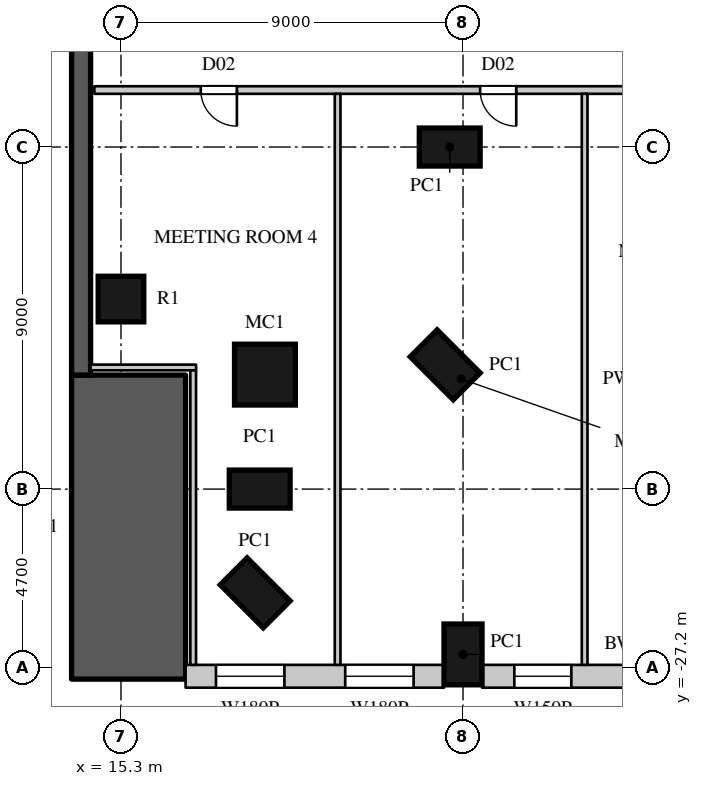
"""IFC4 building model, lengths in metres.
Left out: names, types, materials, properties, quantities, classifications, styles, units other than length and angle.
Written with IfcOpenShell. Run it as: python <this file> out.ifc"""

import sys

from ifc_helpers import new_model, si_unit, direction, frame, frame_2d, origin, origin_2d, place, context, subcontext, project, spatial, rectangle, circle, extrude, element, fill, save


model = new_model("IFC4")
c1 = context("Model", 3, precision=1e-05, world=origin(), true_north=direction((0.0, 1.0)))
c2 = subcontext(c1, "Body", "Model", "MODEL_VIEW")
j1 = project(units=[si_unit("LENGTHUNIT", "METRE"), si_unit("PLANEANGLEUNIT", "RADIAN")], contexts=[c1])
p1 = place(None, origin())
s1 = spatial("IfcSite", under=j1, at=p1, CompositionType="ELEMENT")
p2 = place(p1, origin())
s2 = spatial("IfcBuilding", under=s1, at=p2, CompositionType="ELEMENT")
p3 = place(p2, frame((0.0, 0.0, 19.0)))
s3 = spatial("IfcBuildingStorey", under=s2, at=p3, CompositionType="ELEMENT", Elevation=19.0)
p4 = place(p3, frame((15.5, -27.5, 0.0), z_axis=(0.0, 0.0, 1.0), x_axis=(0.0, 1.0, 0.0)))
e1 = element("IfcWall", 1, at=p4, inside=s3, PredefinedType="SOLIDWALL", context=c2, shape_type="SweptSolid", body=[
    extrude(rectangle(XDim=8.0, YDim=3.0, at=frame_2d((4.0, 0.0))), origin(), (0.0, 0.0, 1.0), 10.0),
])
p5 = place(p3, frame((14.25, -19.5, 0.0), z_axis=(0.0, 0.0, 1.0), x_axis=(0.0, 1.0, 0.0)))
e2 = element("IfcWall", 2, at=p5, inside=s3, PredefinedType="SOLIDWALL", context=c2, shape_type="SweptSolid", body=[
    extrude(rectangle(XDim=39.0, YDim=0.5, at=frame_2d((19.5, 0.0))), origin(), (0.0, 0.0, 1.0), 10.0),
])
for number, where, z_axis, x_axis in (
    (3, (18.831, -25.231, 0.0), (0.0, 0.0, 1.0), (0.707, 0.707, 0.0)),
    (4, (18.95, -22.5, 0.0), (0.0, 0.0, 1.0), (0.0, 1.0, 0.0)),
):
    element("IfcColumn", number, at=place(p3, frame(where, z_axis=z_axis, x_axis=x_axis)), inside=s3, PredefinedType="COLUMN", context=c2, shape_type="SweptSolid", body=[
        extrude(rectangle(XDim=1.0, YDim=1.6, at=origin_2d()), origin(), (0.0, 0.0, 1.0), 10.0),
    ])
p6 = place(p3, frame((19.088, -19.488, 0.0), z_axis=(0.0, 0.0, 1.0), x_axis=(1.0, 0.0, 0.0)))
e5 = element("IfcColumn", 5, at=p6, inside=s3, PredefinedType="COLUMN", context=c2, shape_type="SweptSolid", body=[
    extrude(circle(Radius=0.8, at=origin_2d()), origin(), (0.0, 0.0, 1.0), 10.0),
])
for number, where, z_axis, x_axis in (
    (6, (23.831, -19.231, 0.0), (0.0, 0.0, 1.0), (0.707, 0.707, 0.0)),
    (7, (23.95, -13.5, 0.0), (0.0, 0.0, 1.0), (0.0, 1.0, 0.0)),
    (8, (24.3, -26.85, 0.0), (0.0, 0.0, 1.0), (1.0, 0.0, 0.0)),
):
    element("IfcColumn", number, at=place(p3, frame(where, z_axis=z_axis, x_axis=x_axis)), inside=s3, PredefinedType="COLUMN", context=c2, shape_type="SweptSolid", body=[
        extrude(rectangle(XDim=1.0, YDim=1.6, at=origin_2d()), origin(), (0.0, 0.0, 1.0), 10.0),
    ])
p7 = place(p3, frame((15.3, -17.5, 0.0), z_axis=(0.0, 0.0, 1.0), x_axis=(1.0, 0.0, 0.0)))
e9 = element("IfcColumn", 9, at=p7, inside=s3, PredefinedType="COLUMN", context=c2, shape_type="SweptSolid", body=[
    extrude(circle(Radius=0.6, at=origin_2d()), origin(), (0.0, 0.0, 1.0), 10.0),
])
p8 = place(p3, frame((17.0, -27.425, 0.0), z_axis=(0.0, 0.0, 1.0), x_axis=(1.0, 0.0, 0.0)))
e10 = element("IfcWall", 10, at=p8, inside=s3, PredefinedType="ELEMENTEDWALL", context=c2, shape_type="SweptSolid", body=[
    extrude(rectangle(XDim=6.8, YDim=0.6, at=frame_2d((3.4, 0.0))), origin(), (0.0, 0.0, 1.0), 9.6),
])
p9 = place(p8, frame((0.8, 0.0, 3.0)))
e11 = element("IfcOpeningElement", 11, at=p9, cuts=e10, PredefinedType="OPENING", context=c2, shape_type="SweptSolid", body=[
    extrude(rectangle(XDim=1.8, YDim=2.4, at=frame_2d((0.9, 1.2))), frame((0.0, 0.31, 0.0), z_axis=(0.0, -1.0, 0.0), x_axis=(1.0, 0.0, 0.0)), (0.0, 0.0, 1.0), 0.62),
])
p10 = place(p8, frame((4.2, 0.0, 3.0)))
e12 = element("IfcOpeningElement", 12, at=p10, cuts=e10, PredefinedType="OPENING", context=c2, shape_type="SweptSolid", body=[
    extrude(rectangle(XDim=1.8, YDim=2.4, at=frame_2d((0.9, 1.2))), frame((0.0, 0.31, 0.0), z_axis=(0.0, -1.0, 0.0), x_axis=(1.0, 0.0, 0.0)), (0.0, 0.0, 1.0), 0.62),
])
p11 = place(p3, frame((24.8, -27.425, 0.0), z_axis=(0.0, 0.0, 1.0), x_axis=(1.0, 0.0, 0.0)))
e13 = element("IfcWall", 13, at=p11, inside=s3, PredefinedType="ELEMENTEDWALL", context=c2, shape_type="SweptSolid", body=[
    extrude(rectangle(XDim=8.0, YDim=0.6, at=frame_2d((4.0, 0.0))), origin(), (0.0, 0.0, 1.0), 9.6),
])
p12 = place(p11, frame((4.8, 0.0, 3.0)))
e14 = element("IfcOpeningElement", 14, at=p12, cuts=e13, PredefinedType="OPENING", context=c2, shape_type="SweptSolid", body=[
    extrude(rectangle(XDim=2.4, YDim=2.4, at=frame_2d((1.2, 1.2))), frame((0.0, 0.31, 0.0), z_axis=(0.0, -1.0, 0.0), x_axis=(1.0, 0.0, 0.0)), (0.0, 0.0, 1.0), 0.62),
])
p13 = place(p11, frame((0.85, 0.0, 3.0)))
e15 = element("IfcOpeningElement", 15, at=p13, cuts=e13, PredefinedType="OPENING", context=c2, shape_type="SweptSolid", body=[
    extrude(rectangle(XDim=1.5, YDim=2.4, at=frame_2d((0.75, 1.2))), frame((0.0, 0.31, 0.0), z_axis=(0.0, -1.0, 0.0), x_axis=(1.0, 0.0, 0.0)), (0.0, 0.0, 1.0), 0.62),
])
p14 = place(p3, frame((14.6, -12.0, 0.0), z_axis=(0.0, 0.0, 1.0), x_axis=(1.0, 0.0, 0.0)))
e16 = element("IfcWall", 16, at=p14, inside=s3, PredefinedType="PARTITIONING", context=c2, shape_type="SweptSolid", body=[
    extrude(rectangle(XDim=19.2, YDim=0.2, at=frame_2d((9.6, 0.0))), origin(), (0.0, 0.0, 1.0), 9.598),
])
p15 = place(p14, frame((2.8, 0.0, 0.0)))
e17 = element("IfcOpeningElement", 17, at=p15, cuts=e16, PredefinedType="OPENING", context=c2, shape_type="SweptSolid", body=[
    extrude(rectangle(XDim=0.95, YDim=2.2, at=frame_2d((0.475, 1.1))), frame((0.0, 0.11, 0.0), z_axis=(0.0, -1.0, 0.0), x_axis=(1.0, 0.0, 0.0)), (0.0, 0.0, 1.0), 0.22),
])
p16 = place(p14, frame((10.15, 0.0, 0.0)))
e18 = element("IfcOpeningElement", 18, at=p16, cuts=e16, PredefinedType="OPENING", context=c2, shape_type="SweptSolid", body=[
    extrude(rectangle(XDim=0.95, YDim=2.2, at=frame_2d((0.475, 1.1))), frame((0.0, 0.11, 0.0), z_axis=(0.0, -1.0, 0.0), x_axis=(1.0, 0.0, 0.0)), (0.0, 0.0, 1.0), 0.22),
])
p17 = place(p14, frame((15.5, 0.0, 0.0)))
e19 = element("IfcOpeningElement", 19, at=p17, cuts=e16, PredefinedType="OPENING", context=c2, shape_type="SweptSolid", body=[
    extrude(rectangle(XDim=0.95, YDim=2.2, at=frame_2d((0.475, 1.1))), frame((0.0, 0.11, 0.0), z_axis=(0.0, -1.0, 0.0), x_axis=(1.0, 0.0, 0.0)), (0.0, 0.0, 1.0), 0.22),
])
p18 = place(p3, frame((14.5, -19.3, 0.0), z_axis=(0.0, 0.0, 1.0), x_axis=(1.0, 0.0, 0.0)))
e20 = element("IfcWall", 20, at=p18, inside=s3, PredefinedType="PARTITIONING", context=c2, shape_type="SweptSolid", body=[
    extrude(rectangle(XDim=2.775, YDim=0.15, at=frame_2d((1.387, 0.0))), origin(), (0.0, 0.0, 1.0), 9.598),
])
p19 = place(p3, frame((17.2, -27.125, 0.0), z_axis=(0.0, 0.0, 1.0), x_axis=(0.0, 1.0, 0.0)))
e21 = element("IfcWall", 21, at=p19, inside=s3, PredefinedType="PARTITIONING", context=c2, shape_type="SweptSolid", body=[
    extrude(rectangle(XDim=7.75, YDim=0.15, at=frame_2d((3.875, 0.0))), origin(), (0.0, 0.0, 1.0), 9.598),
])
for number, where, z_axis, x_axis in (
    (22, (21.0, -27.125, 0.0), (0.0, 0.0, 1.0), (0.0, 1.0, 0.0)),
    (23, (27.5, -27.125, 0.0), (0.0, 0.0, 1.0), (0.0, 1.0, 0.0)),
):
    element("IfcWall", number, at=place(p3, frame(where, z_axis=z_axis, x_axis=x_axis)), inside=s3, PredefinedType="PARTITIONING", context=c2, shape_type="SweptSolid", body=[
        extrude(rectangle(XDim=15.025, YDim=0.15, at=frame_2d((7.512, 0.0))), origin(), (0.0, 0.0, 1.0), 9.598),
    ])
p20 = place(p9, origin())
e24 = element("IfcWindow", 24, at=p20, inside=s3, PartitioningType="SINGLE_PANEL", PredefinedType="WINDOW", context=c2, shape_type="SweptSolid", body=[
    extrude(rectangle(XDim=1.8, YDim=2.4, at=frame_2d((0.9, 1.2))), frame((0.0, 0.06, 0.0), z_axis=(0.0, -1.0, 0.0), x_axis=(1.0, 0.0, 0.0)), (0.0, 0.0, 1.0), 0.06),
])
fill(e11, e24)
p21 = place(p10, origin())
e25 = element("IfcWindow", 25, at=p21, inside=s3, PartitioningType="SINGLE_PANEL", PredefinedType="WINDOW", context=c2, shape_type="SweptSolid", body=[
    extrude(rectangle(XDim=1.8, YDim=2.4, at=frame_2d((0.9, 1.2))), frame((0.0, 0.06, 0.0), z_axis=(0.0, -1.0, 0.0), x_axis=(1.0, 0.0, 0.0)), (0.0, 0.0, 1.0), 0.06),
])
fill(e12, e25)
p22 = place(p15, origin())
e26 = element("IfcDoor", 26, at=p22, inside=s3, OperationType="SINGLE_SWING_LEFT", PredefinedType="DOOR", context=c2, shape_type="SweptSolid", body=[
    extrude(rectangle(XDim=0.95, YDim=2.2, at=frame_2d((0.475, 1.1))), frame((0.0, 0.025, 0.0), z_axis=(0.0, -1.0, 0.0), x_axis=(1.0, 0.0, 0.0)), (0.0, 0.0, 1.0), 0.05),
])
fill(e17, e26)
p23 = place(p16, origin())
e27 = element("IfcDoor", 27, at=p23, inside=s3, OperationType="SINGLE_SWING_LEFT", PredefinedType="DOOR", context=c2, shape_type="SweptSolid", body=[
    extrude(rectangle(XDim=0.95, YDim=2.2, at=frame_2d((0.475, 1.1))), frame((0.0, 0.025, 0.0), z_axis=(0.0, -1.0, 0.0), x_axis=(1.0, 0.0, 0.0)), (0.0, 0.0, 1.0), 0.05),
])
fill(e18, e27)
p24 = place(p13, origin())
e28 = element("IfcWindow", 28, at=p24, inside=s3, PartitioningType="SINGLE_PANEL", PredefinedType="WINDOW", context=c2, shape_type="SweptSolid", body=[
    extrude(rectangle(XDim=1.5, YDim=2.4, at=frame_2d((0.75, 1.2))), frame((0.0, 0.06, 0.0), z_axis=(0.0, -1.0, 0.0), x_axis=(1.0, 0.0, 0.0)), (0.0, 0.0, 1.0), 0.06),
])
fill(e15, e28)
save(model, sys.argv[1])
